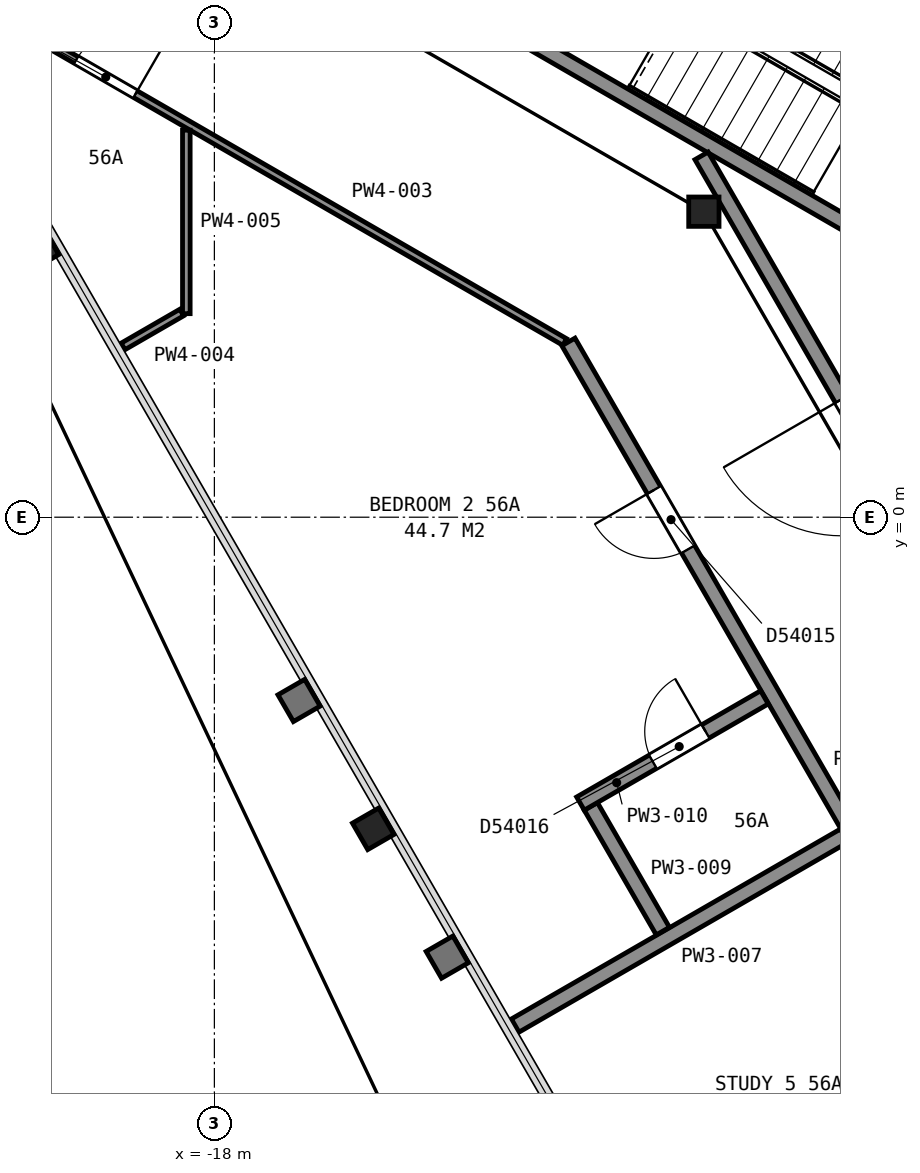
"""IFC4 building model, lengths in metres.
Left out: names, types, materials, properties, quantities, classifications, styles, units other than length and angle.
Written with IfcOpenShell. Run it as: python <this file> out.ifc"""

import sys

from ifc_helpers import new_model, si_unit, direction, frame, frame_2d, origin, origin_2d, place, context, subcontext, project, spatial, rectangle, i_section, extrude, element, fill, save


model = new_model("IFC4")
c1 = context("Model", 3, precision=1e-05, world=origin(), true_north=direction((0.0, 1.0)))
c2 = subcontext(c1, "Body", "Model", "MODEL_VIEW")
j1 = project(units=[si_unit("LENGTHUNIT", "METRE"), si_unit("PLANEANGLEUNIT", "RADIAN")], contexts=[c1])
p1 = place(None, origin())
s1 = spatial("IfcSite", under=j1, at=p1, CompositionType="ELEMENT")
p2 = place(p1, origin())
s2 = spatial("IfcBuilding", under=s1, at=p2, CompositionType="ELEMENT")
p3 = place(p2, frame((0.0, 0.0, 224.9)))
s3 = spatial("IfcBuildingStorey", under=s2, at=p3, CompositionType="ELEMENT", Elevation=224.9)
for number, where, z_axis, x_axis in (
    (1, (-20.32, 3.53, 0.0), (0.0, 0.0, 1.0), (-0.5, 0.866, 0.0)),
    (2, (-15.91, -4.1, 0.0), (0.0, 0.0, 1.0), (-0.5, 0.866, 0.0)),
):
    element("IfcColumn", number, at=place(p3, frame(where, z_axis=z_axis, x_axis=x_axis)), inside=s3, PredefinedType="COLUMN", context=c2, shape_type="SweptSolid", body=[
        extrude(i_section(OverallWidth=0.401, OverallDepth=0.399, WebThickness=0.025, FlangeThickness=0.04, FilletRadius=0.015, at=origin_2d()), origin(), (0.0, 0.0, 1.0), 3.7),
    ])
p4 = place(p3, frame((-11.56, 4.02, 0.0), z_axis=(0.0, 0.0, 1.0), x_axis=(1.0, 0.0, 0.0)))
e3 = element("IfcColumn", 3, at=p4, inside=s3, PredefinedType="COLUMN", context=c2, shape_type="SweptSolid", body=[
    extrude(i_section(OverallWidth=0.399, OverallDepth=0.386, WebThickness=0.021, FlangeThickness=0.033, FilletRadius=0.015, at=origin_2d()), origin(), (0.0, 0.0, 1.0), 3.7),
])
for number, where, z_axis, x_axis in (
    (4, (-7.678, 2.701, 0.0), (0.0, 0.0, 1.0), (-0.866, 0.5, 0.0)),
    (5, (-6.178, 5.299, 0.0), (0.0, 0.0, 1.0), (-0.866, 0.5, 0.0)),
):
    element("IfcWall", number, at=place(p3, frame(where, z_axis=z_axis, x_axis=x_axis)), inside=s3, PredefinedType="PARTITIONING", context=c2, shape_type="SweptSolid", body=[
        extrude(rectangle(XDim=9.6, YDim=0.2, at=frame_2d((4.8, 0.0))), origin(), (0.0, 0.0, 1.0), 3.45),
    ])
p5 = place(p3, frame((-11.591, 4.755, 0.0), z_axis=(0.0, 0.0, 1.0), x_axis=(0.500043977787, -0.866000011708, 0.0)))
e6 = element("IfcWall", 6, at=p5, inside=s3, PredefinedType="PARTITIONING", context=c2, shape_type="SweptSolid", body=[
    extrude(rectangle(XDim=6.617, YDim=0.2, at=frame_2d((3.308, 0.0))), origin(), (0.0, 0.0, 1.0), 3.45),
])
p6 = place(p5, frame((3.695, 0.0, 0.0)))
e7 = element("IfcOpeningElement", 7, at=p6, cuts=e6, PredefinedType="OPENING", context=c2, shape_type="SweptSolid", body=[
    extrude(rectangle(XDim=1.8, YDim=2.1, at=frame_2d((0.9, 1.05))), frame((0.0, 0.11, 0.0), z_axis=(0.0, -1.0, 0.0), x_axis=(1.0, 0.0, 0.0)), (0.0, 0.0, 1.0), 0.22),
])
p7 = place(p3, frame((-13.391, 2.305, 0.0), z_axis=(0.0, 0.0, 1.0), x_axis=(-0.86606177021, 0.499937006213, 0.0)))
e8 = element("IfcWall", 8, at=p7, inside=s3, PredefinedType="PARTITIONING", context=c2, shape_type="SweptSolid", body=[
    extrude(rectangle(XDim=8.504, YDim=0.1, at=frame_2d((4.252, 0.0))), origin(), (0.0, 0.0, 1.0), 2.713),
])
p8 = place(p7, frame((6.522, 0.0, 0.0)))
e9 = element("IfcOpeningElement", 9, at=p8, cuts=e8, PredefinedType="OPENING", context=c2, shape_type="SweptSolid", body=[
    extrude(rectangle(XDim=0.9, YDim=2.1, at=frame_2d((0.45, 1.05))), frame((0.0, 0.06, 0.0), z_axis=(0.0, -1.0, 0.0), x_axis=(1.0, 0.0, 0.0)), (0.0, 0.0, 1.0), 0.12),
])
p9 = place(p3, frame((-19.202, 2.247, 0.0), z_axis=(0.0, 0.0, 1.0), x_axis=(0.86604424267, 0.499967368674, 0.0)))
e10 = element("IfcWall", 10, at=p9, inside=s3, PredefinedType="PARTITIONING", context=c2, shape_type="SweptSolid", body=[
    extrude(rectangle(XDim=0.892, YDim=0.1, at=frame_2d((0.446, 0.0))), origin(), (0.0, 0.0, 1.0), 2.713),
])
p10 = place(p3, frame((-18.369, 2.678, 0.0), z_axis=(0.0, 0.0, 1.0), x_axis=(0.0, 1.0, 0.0)))
e11 = element("IfcWall", 11, at=p10, inside=s3, PredefinedType="PARTITIONING", context=c2, shape_type="SweptSolid", body=[
    extrude(rectangle(XDim=2.414, YDim=0.1, at=frame_2d((1.207, 0.0))), origin(), (0.0, 0.0, 1.0), 2.713),
])
p11 = place(p3, frame((-14.043, -6.689, 0.0), z_axis=(0.0, 0.0, 1.0), x_axis=(0.866053039883, 0.499952129818, 0.0)))
e12 = element("IfcWall", 12, at=p11, inside=s3, PredefinedType="PARTITIONING", context=c2, shape_type="SweptSolid", body=[
    extrude(rectangle(XDim=5.0, YDim=0.2, at=frame_2d((2.5, 0.0))), origin(), (0.0, 0.0, 1.0), 2.713),
])
p12 = place(p3, frame((-4.675, -12.706, 0.0), z_axis=(0.0, 0.0, 1.0), x_axis=(-0.49997440863, 0.866040178465, 0.0)))
e13 = element("IfcWall", 13, at=p12, inside=s3, PredefinedType="PARTITIONING", context=c2, shape_type="SweptSolid", body=[
    extrude(rectangle(XDim=17.335, YDim=0.2, at=frame_2d((8.667, 0.0))), origin(), (0.0, 0.0, 1.0), 2.713),
])
p13 = place(p12, frame((14.185, 0.0, 0.0)))
e14 = element("IfcOpeningElement", 14, at=p13, cuts=e13, PredefinedType="OPENING", context=c2, shape_type="SweptSolid", body=[
    extrude(rectangle(XDim=0.9, YDim=2.1, at=frame_2d((0.45, 1.05))), frame((0.0, 0.11, 0.0), z_axis=(0.0, -1.0, 0.0), x_axis=(1.0, 0.0, 0.0)), (0.0, 0.0, 1.0), 0.22),
])
p14 = place(p12, frame((6.895, 0.0, 0.0)))
e15 = element("IfcOpeningElement", 15, at=p14, cuts=e13, PredefinedType="OPENING", context=c2, shape_type="SweptSolid", body=[
    extrude(rectangle(XDim=0.9, YDim=2.1, at=frame_2d((0.45, 1.05))), frame((0.0, 0.11, 0.0), z_axis=(0.0, -1.0, 0.0), x_axis=(1.0, 0.0, 0.0)), (0.0, 0.0, 1.0), 0.22),
])
p15 = place(p12, frame((1.979, 0.0, 0.0)))
e16 = element("IfcOpeningElement", 16, at=p15, cuts=e13, PredefinedType="OPENING", context=c2, shape_type="SweptSolid", body=[
    extrude(rectangle(XDim=0.9, YDim=2.1, at=frame_2d((0.45, 1.05))), frame((0.0, 0.11, 0.0), z_axis=(0.0, -1.0, 0.0), x_axis=(1.0, 0.0, 0.0)), (0.0, 0.0, 1.0), 0.22),
])
p16 = place(p3, frame((-13.047, -3.805, 0.0), z_axis=(0.0, 0.0, 1.0), x_axis=(0.499949193323, -0.866054735046, 0.0)))
e17 = element("IfcWall", 17, at=p16, inside=s3, PredefinedType="PARTITIONING", context=c2, shape_type="SweptSolid", body=[
    extrude(rectangle(XDim=1.895, YDim=0.2, at=frame_2d((0.948, 0.0))), origin(), (0.0, 0.0, 1.0), 2.713),
])
p17 = place(p3, frame((-10.763, -2.371, 0.0), z_axis=(0.0, 0.0, 1.0), x_axis=(-0.866041588165, -0.499971966783, 0.0)))
e18 = element("IfcWall", 18, at=p17, inside=s3, PredefinedType="PARTITIONING", context=c2, shape_type="SweptSolid", body=[
    extrude(rectangle(XDim=2.795, YDim=0.2, at=frame_2d((1.397, 0.0))), origin(), (0.0, 0.0, 1.0), 2.713),
])
p18 = place(p17, frame((0.895, 0.0, 0.0)))
e19 = element("IfcOpeningElement", 19, at=p18, cuts=e18, PredefinedType="OPENING", context=c2, shape_type="SweptSolid", body=[
    extrude(rectangle(XDim=0.8, YDim=2.1, at=frame_2d((0.4, 1.05))), frame((0.0, 0.11, 0.0), z_axis=(0.0, -1.0, 0.0), x_axis=(1.0, 0.0, 0.0)), (0.0, 0.0, 1.0), 0.22),
])
p19 = place(p6, origin())
e20 = element("IfcDoor", 20, at=p19, inside=s3, OperationType="DOUBLE_DOOR_SINGLE_SWING", PredefinedType="DOOR", context=c2, shape_type="SweptSolid", body=[
    extrude(rectangle(XDim=1.8, YDim=2.1, at=frame_2d((0.9, 1.05))), frame((0.0, 0.025, 0.0), z_axis=(0.0, -1.0, 0.0), x_axis=(1.0, 0.0, 0.0)), (0.0, 0.0, 1.0), 0.05),
])
fill(e7, e20)
p20 = place(p8, origin())
e21 = element("IfcDoor", 21, at=p20, inside=s3, OperationType="SINGLE_SWING_LEFT", PredefinedType="DOOR", context=c2, shape_type="SweptSolid", body=[
    extrude(rectangle(XDim=0.9, YDim=2.1, at=frame_2d((0.45, 1.05))), frame((0.0, 0.025, 0.0), z_axis=(0.0, -1.0, 0.0), x_axis=(1.0, 0.0, 0.0)), (0.0, 0.0, 1.0), 0.05),
])
fill(e9, e21)
p21 = place(p13, origin())
e22 = element("IfcDoor", 22, at=p21, inside=s3, OperationType="SINGLE_SWING_RIGHT", PredefinedType="DOOR", context=c2, shape_type="SweptSolid", body=[
    extrude(rectangle(XDim=0.9, YDim=2.1, at=frame_2d((0.45, 1.05))), frame((0.0, 0.025, 0.0), z_axis=(0.0, -1.0, 0.0), x_axis=(1.0, 0.0, 0.0)), (0.0, 0.0, 1.0), 0.05),
])
fill(e14, e22)
p22 = place(p18, origin())
e23 = element("IfcDoor", 23, at=p22, inside=s3, OperationType="SINGLE_SWING_LEFT", PredefinedType="DOOR", context=c2, shape_type="SweptSolid", body=[
    extrude(rectangle(XDim=0.8, YDim=2.1, at=frame_2d((0.4, 1.05))), frame((0.0, 0.025, 0.0), z_axis=(0.0, -1.0, 0.0), x_axis=(1.0, 0.0, 0.0)), (0.0, 0.0, 1.0), 0.05),
])
fill(e19, e23)
save(model, sys.argv[1])
